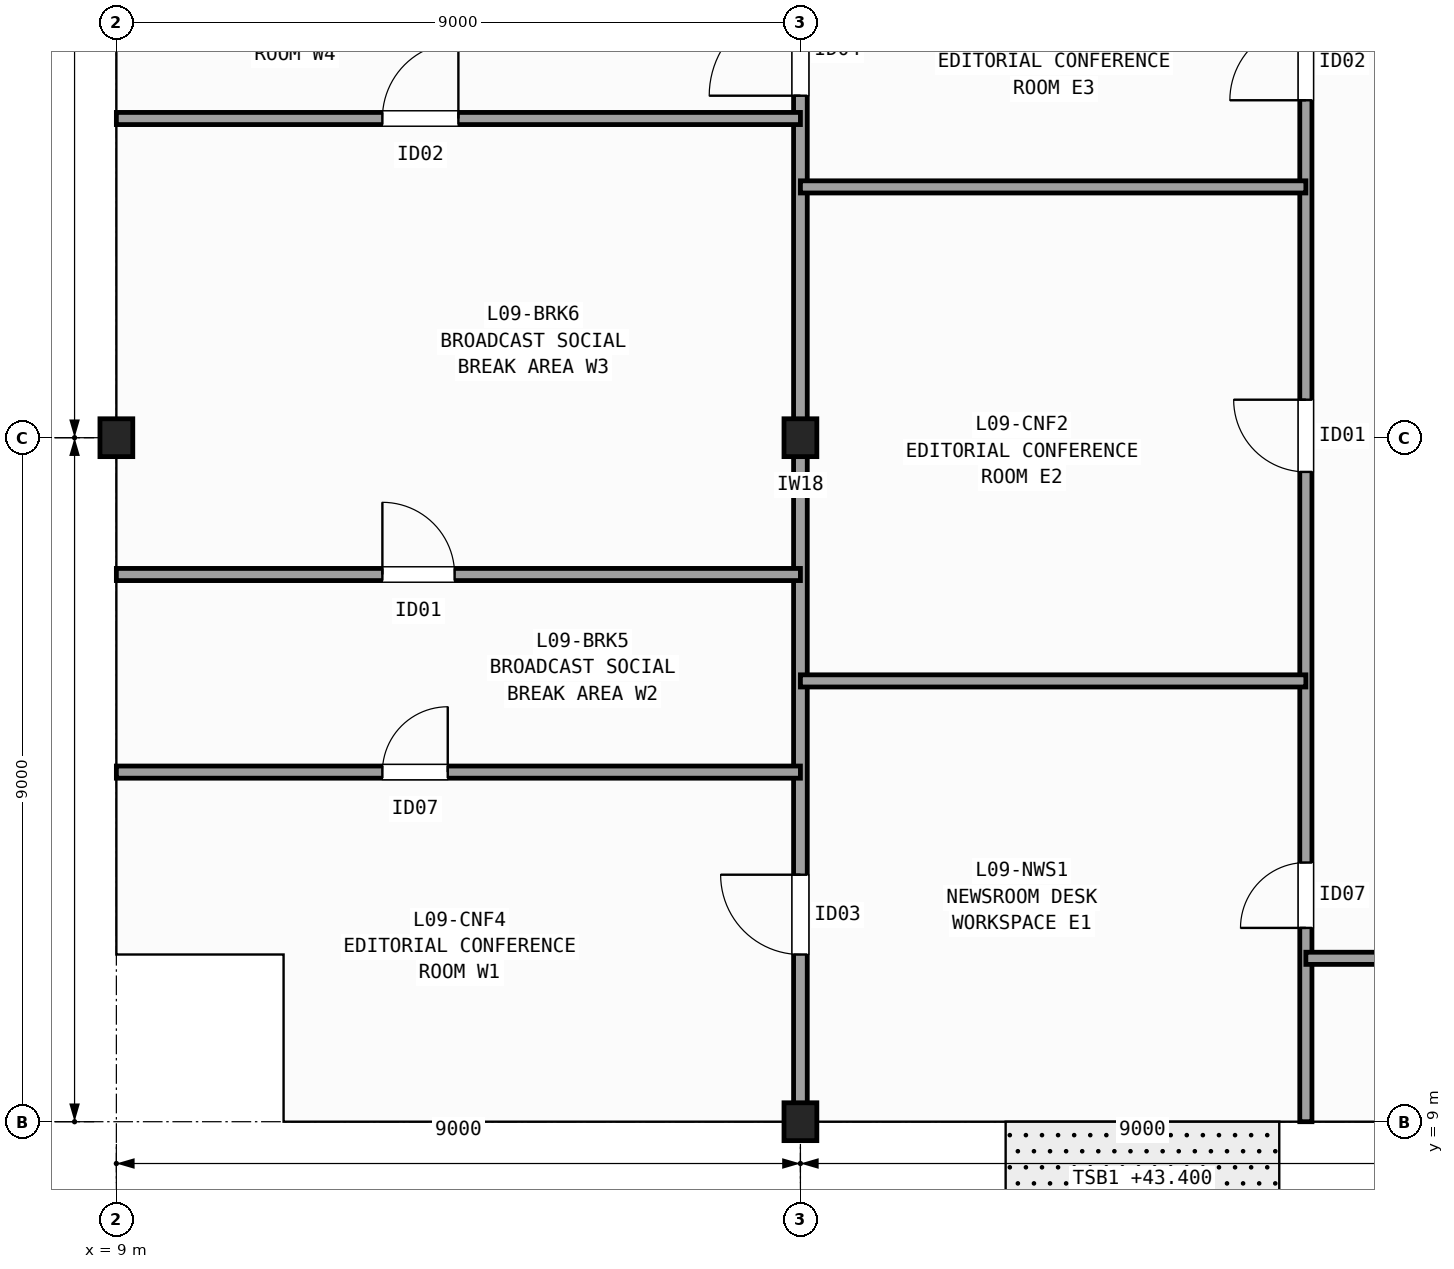
"""IFC4 building model, lengths in metres.
Left out: names, types, materials, properties, quantities, classifications, styles, units other than length and angle.
Written with IfcOpenShell. Run it as: python <this file> out.ifc"""

import sys

from ifc_helpers import new_model, si_unit, direction, frame, frame_2d, origin, origin_2d, place, context, subcontext, project, spatial, rectangle, i_section, extrude, element, fill, save


model = new_model("IFC4")
c1 = context("Model", 3, precision=1e-05, world=origin(), true_north=direction((0.0, 1.0)))
c2 = subcontext(c1, "Body", "Model", "MODEL_VIEW")
j1 = project(units=[si_unit("LENGTHUNIT", "METRE"), si_unit("PLANEANGLEUNIT", "RADIAN")], contexts=[c1])
p1 = place(None, origin())
s1 = spatial("IfcSite", under=j1, at=p1, CompositionType="ELEMENT")
p2 = place(p1, origin())
s2 = spatial("IfcBuilding", under=s1, at=p2, CompositionType="ELEMENT")
p3 = place(p2, frame((0.0, 0.0, 43.4)))
s3 = spatial("IfcBuildingStorey", under=s2, at=p3, CompositionType="ELEMENT", Elevation=43.4)
for number, where, z_axis, x_axis in (
    (1, (9.0, 18.0, 0.0), (0.0, 0.0, 1.0), (1.0, 0.0, 0.0)),
    (2, (18.0, 9.0, 0.0), (0.0, 0.0, 1.0), (1.0, 0.0, 0.0)),
    (3, (18.0, 18.0, 0.0), (0.0, 0.0, 1.0), (1.0, 0.0, 0.0)),
):
    element("IfcColumn", number, at=place(p3, frame(where, z_axis=z_axis, x_axis=x_axis)), inside=s3, PredefinedType="COLUMN", context=c2, shape_type="SweptSolid", body=[
        extrude(i_section(OverallWidth=0.432, OverallDepth=0.498, WebThickness=0.056, FlangeThickness=0.089, FilletRadius=0.015, at=origin_2d()), origin(), (0.0, 0.0, 1.0), 3.7),
    ])
p4 = place(p3, frame((24.65, 9.0, 0.0), z_axis=(0.0, 0.0, 1.0), x_axis=(0.0, 1.0, 0.0)))
e4 = element("IfcWall", 4, at=p4, inside=s3, PredefinedType="PARTITIONING", context=c2, shape_type="SweptSolid", body=[
    extrude(rectangle(XDim=19.2, YDim=0.16, at=frame_2d((9.6, 0.0))), origin(), (0.0, 0.0, 1.0), 2.627),
])
p5 = place(p4, frame((2.55, 0.0, 0.0)))
e5 = element("IfcOpeningElement", 5, at=p5, cuts=e4, PredefinedType="OPENING", context=c2, shape_type="SweptSolid", body=[
    extrude(rectangle(XDim=0.86, YDim=2.05, at=frame_2d((0.43, 1.025))), frame((0.0, 0.09, 0.0), z_axis=(0.0, -1.0, 0.0), x_axis=(1.0, 0.0, 0.0)), (0.0, 0.0, 1.0), 0.18),
])
p6 = place(p4, frame((8.55, 0.0, 0.0)))
e6 = element("IfcOpeningElement", 6, at=p6, cuts=e4, PredefinedType="OPENING", context=c2, shape_type="SweptSolid", body=[
    extrude(rectangle(XDim=0.95, YDim=2.1, at=frame_2d((0.475, 1.05))), frame((0.0, 0.09, 0.0), z_axis=(0.0, -1.0, 0.0), x_axis=(1.0, 0.0, 0.0)), (0.0, 0.0, 1.0), 0.18),
])
p7 = place(p4, frame((13.44, 0.0, 0.0)))
e7 = element("IfcOpeningElement", 7, at=p7, cuts=e4, PredefinedType="OPENING", context=c2, shape_type="SweptSolid", body=[
    extrude(rectangle(XDim=1.0, YDim=2.1, at=frame_2d((0.5, 1.05))), frame((0.0, 0.09, 0.0), z_axis=(0.0, -1.0, 0.0), x_axis=(1.0, 0.0, 0.0)), (0.0, 0.0, 1.0), 0.18),
])
p8 = place(p3, frame((18.0, 9.0, 0.0), z_axis=(0.0, 0.0, 1.0), x_axis=(0.0, 1.0, 0.0)))
e8 = element("IfcWall", 8, at=p8, inside=s3, PredefinedType="PARTITIONING", context=c2, shape_type="SweptSolid", body=[
    extrude(rectangle(XDim=15.58, YDim=0.18, at=frame_2d((7.79, 0.0))), origin(), (0.0, 0.0, 1.0), 2.627),
])
p9 = place(p8, frame((2.2, 0.0, 0.0)))
e9 = element("IfcOpeningElement", 9, at=p9, cuts=e8, PredefinedType="OPENING", context=c2, shape_type="SweptSolid", body=[
    extrude(rectangle(XDim=1.05, YDim=2.15, at=frame_2d((0.525, 1.075))), frame((0.0, 0.1, 0.0), z_axis=(0.0, -1.0, 0.0), x_axis=(1.0, 0.0, 0.0)), (0.0, 0.0, 1.0), 0.2),
])
p10 = place(p8, frame((13.5, 0.0, 0.0)))
e10 = element("IfcOpeningElement", 10, at=p10, cuts=e8, PredefinedType="OPENING", context=c2, shape_type="SweptSolid", body=[
    extrude(rectangle(XDim=1.2, YDim=2.15, at=frame_2d((0.6, 1.075))), frame((0.0, 0.1, 0.0), z_axis=(0.0, -1.0, 0.0), x_axis=(1.0, 0.0, 0.0)), (0.0, 0.0, 1.0), 0.2),
])
p11 = place(p3, frame((18.0, 14.8, 0.0), z_axis=(0.0, 0.0, 1.0), x_axis=(1.0, 0.0, 0.0)))
e11 = element("IfcWall", 11, at=p11, inside=s3, PredefinedType="PARTITIONING", context=c2, shape_type="SweptSolid", body=[
    extrude(rectangle(XDim=6.65, YDim=0.16, at=frame_2d((3.325, 0.0))), origin(), (0.0, 0.0, 1.0), 2.789),
])
p12 = place(p3, frame((18.0, 21.3, 0.0), z_axis=(0.0, 0.0, 1.0), x_axis=(1.0, 0.0, 0.0)))
e12 = element("IfcWall", 12, at=p12, inside=s3, PredefinedType="PARTITIONING", context=c2, shape_type="SweptSolid", body=[
    extrude(rectangle(XDim=6.65, YDim=0.16, at=frame_2d((3.325, 0.0))), origin(), (0.0, 0.0, 1.0), 2.792),
])
p13 = place(p3, frame((9.0, 13.6, 0.0), z_axis=(0.0, 0.0, 1.0), x_axis=(1.0, 0.0, 0.0)))
e13 = element("IfcWall", 13, at=p13, inside=s3, PredefinedType="PARTITIONING", context=c2, shape_type="SweptSolid", body=[
    extrude(rectangle(XDim=9.0, YDim=0.16, at=frame_2d((4.5, 0.0))), origin(), (0.0, 0.0, 1.0), 2.792),
])
p14 = place(p13, frame((3.5, 0.0, 0.0)))
e14 = element("IfcOpeningElement", 14, at=p14, cuts=e13, PredefinedType="OPENING", context=c2, shape_type="SweptSolid", body=[
    extrude(rectangle(XDim=0.86, YDim=2.05, at=frame_2d((0.43, 1.025))), frame((0.0, 0.09, 0.0), z_axis=(0.0, -1.0, 0.0), x_axis=(1.0, 0.0, 0.0)), (0.0, 0.0, 1.0), 0.18),
])
p15 = place(p3, frame((9.0, 16.2, 0.0), z_axis=(0.0, 0.0, 1.0), x_axis=(1.0, 0.0, 0.0)))
e15 = element("IfcWall", 15, at=p15, inside=s3, PredefinedType="PARTITIONING", context=c2, shape_type="SweptSolid", body=[
    extrude(rectangle(XDim=9.0, YDim=0.16, at=frame_2d((4.5, 0.0))), origin(), (0.0, 0.0, 1.0), 2.792),
])
p16 = place(p15, frame((3.5, 0.0, 0.0)))
e16 = element("IfcOpeningElement", 16, at=p16, cuts=e15, PredefinedType="OPENING", context=c2, shape_type="SweptSolid", body=[
    extrude(rectangle(XDim=0.95, YDim=2.1, at=frame_2d((0.475, 1.05))), frame((0.0, 0.09, 0.0), z_axis=(0.0, -1.0, 0.0), x_axis=(1.0, 0.0, 0.0)), (0.0, 0.0, 1.0), 0.18),
])
p17 = place(p3, frame((9.0, 22.2, 0.0), z_axis=(0.0, 0.0, 1.0), x_axis=(1.0, 0.0, 0.0)))
e17 = element("IfcWall", 17, at=p17, inside=s3, PredefinedType="PARTITIONING", context=c2, shape_type="SweptSolid", body=[
    extrude(rectangle(XDim=9.0, YDim=0.16, at=frame_2d((4.5, 0.0))), origin(), (0.0, 0.0, 1.0), 2.627),
])
p18 = place(p17, frame((3.5, 0.0, 0.0)))
e18 = element("IfcOpeningElement", 18, at=p18, cuts=e17, PredefinedType="OPENING", context=c2, shape_type="SweptSolid", body=[
    extrude(rectangle(XDim=1.0, YDim=2.1, at=frame_2d((0.5, 1.05))), frame((0.0, 0.09, 0.0), z_axis=(0.0, -1.0, 0.0), x_axis=(1.0, 0.0, 0.0)), (0.0, 0.0, 1.0), 0.18),
])
p19 = place(p3, frame((24.65, 11.15, 0.0), z_axis=(0.0, 0.0, 1.0), x_axis=(1.0, 0.0, 0.0)))
e19 = element("IfcWall", 19, at=p19, inside=s3, PredefinedType="PARTITIONING", context=c2, shape_type="SweptSolid", body=[
    extrude(rectangle(XDim=4.75, YDim=0.16, at=frame_2d((2.375, 0.0))), origin(), (0.0, 0.0, 1.0), 2.792),
])
p20 = place(p19, frame((1.2, 0.0, 0.0)))
e20 = element("IfcOpeningElement", 20, at=p20, cuts=e19, PredefinedType="OPENING", context=c2, shape_type="SweptSolid", body=[
    extrude(rectangle(XDim=0.95, YDim=2.1, at=frame_2d((0.475, 1.05))), frame((0.0, 0.09, 0.0), z_axis=(0.0, -1.0, 0.0), x_axis=(1.0, 0.0, 0.0)), (0.0, 0.0, 1.0), 0.18),
])
p21 = place(p5, origin())
e21 = element("IfcDoor", 21, at=p21, inside=s3, OperationType="SINGLE_SWING_LEFT", PredefinedType="DOOR", context=c2, shape_type="SweptSolid", body=[
    extrude(rectangle(XDim=0.86, YDim=2.05, at=frame_2d((0.43, 1.025))), frame((0.0, 0.025, 0.0), z_axis=(0.0, -1.0, 0.0), x_axis=(1.0, 0.0, 0.0)), (0.0, 0.0, 1.0), 0.05),
])
fill(e5, e21)
p22 = place(p6, origin())
e22 = element("IfcDoor", 22, at=p22, inside=s3, OperationType="SINGLE_SWING_RIGHT", PredefinedType="DOOR", context=c2, shape_type="SweptSolid", body=[
    extrude(rectangle(XDim=0.95, YDim=2.1, at=frame_2d((0.475, 1.05))), frame((0.0, 0.025, 0.0), z_axis=(0.0, -1.0, 0.0), x_axis=(1.0, 0.0, 0.0)), (0.0, 0.0, 1.0), 0.05),
])
fill(e6, e22)
p23 = place(p7, origin())
e23 = element("IfcDoor", 23, at=p23, inside=s3, OperationType="SINGLE_SWING_LEFT", PredefinedType="DOOR", context=c2, shape_type="SweptSolid", body=[
    extrude(rectangle(XDim=1.0, YDim=2.1, at=frame_2d((0.5, 1.05))), frame((0.0, 0.025, 0.0), z_axis=(0.0, -1.0, 0.0), x_axis=(1.0, 0.0, 0.0)), (0.0, 0.0, 1.0), 0.05),
])
fill(e7, e23)
p24 = place(p9, origin())
e24 = element("IfcDoor", 24, at=p24, inside=s3, OperationType="SINGLE_SWING_RIGHT", PredefinedType="DOOR", context=c2, shape_type="SweptSolid", body=[
    extrude(rectangle(XDim=1.05, YDim=2.15, at=frame_2d((0.525, 1.075))), frame((0.0, 0.025, 0.0), z_axis=(0.0, -1.0, 0.0), x_axis=(1.0, 0.0, 0.0)), (0.0, 0.0, 1.0), 0.05),
])
fill(e9, e24)
p25 = place(p10, origin())
e25 = element("IfcDoor", 25, at=p25, inside=s3, OperationType="SINGLE_SWING_LEFT", PredefinedType="DOOR", context=c2, shape_type="SweptSolid", body=[
    extrude(rectangle(XDim=1.2, YDim=2.15, at=frame_2d((0.6, 1.075))), frame((0.0, 0.025, 0.0), z_axis=(0.0, -1.0, 0.0), x_axis=(1.0, 0.0, 0.0)), (0.0, 0.0, 1.0), 0.05),
])
fill(e10, e25)
p26 = place(p14, origin())
e26 = element("IfcDoor", 26, at=p26, inside=s3, OperationType="SINGLE_SWING_RIGHT", PredefinedType="DOOR", context=c2, shape_type="SweptSolid", body=[
    extrude(rectangle(XDim=0.86, YDim=2.05, at=frame_2d((0.43, 1.025))), frame((0.0, 0.025, 0.0), z_axis=(0.0, -1.0, 0.0), x_axis=(1.0, 0.0, 0.0)), (0.0, 0.0, 1.0), 0.05),
])
fill(e14, e26)
p27 = place(p16, origin())
e27 = element("IfcDoor", 27, at=p27, inside=s3, OperationType="SINGLE_SWING_LEFT", PredefinedType="DOOR", context=c2, shape_type="SweptSolid", body=[
    extrude(rectangle(XDim=0.95, YDim=2.1, at=frame_2d((0.475, 1.05))), frame((0.0, 0.025, 0.0), z_axis=(0.0, -1.0, 0.0), x_axis=(1.0, 0.0, 0.0)), (0.0, 0.0, 1.0), 0.05),
])
fill(e16, e27)
p28 = place(p18, origin())
e28 = element("IfcDoor", 28, at=p28, inside=s3, OperationType="SINGLE_SWING_RIGHT", PredefinedType="DOOR", context=c2, shape_type="SweptSolid", body=[
    extrude(rectangle(XDim=1.0, YDim=2.1, at=frame_2d((0.5, 1.05))), frame((0.0, 0.025, 0.0), z_axis=(0.0, -1.0, 0.0), x_axis=(1.0, 0.0, 0.0)), (0.0, 0.0, 1.0), 0.05),
])
fill(e18, e28)
save(model, sys.argv[1])
